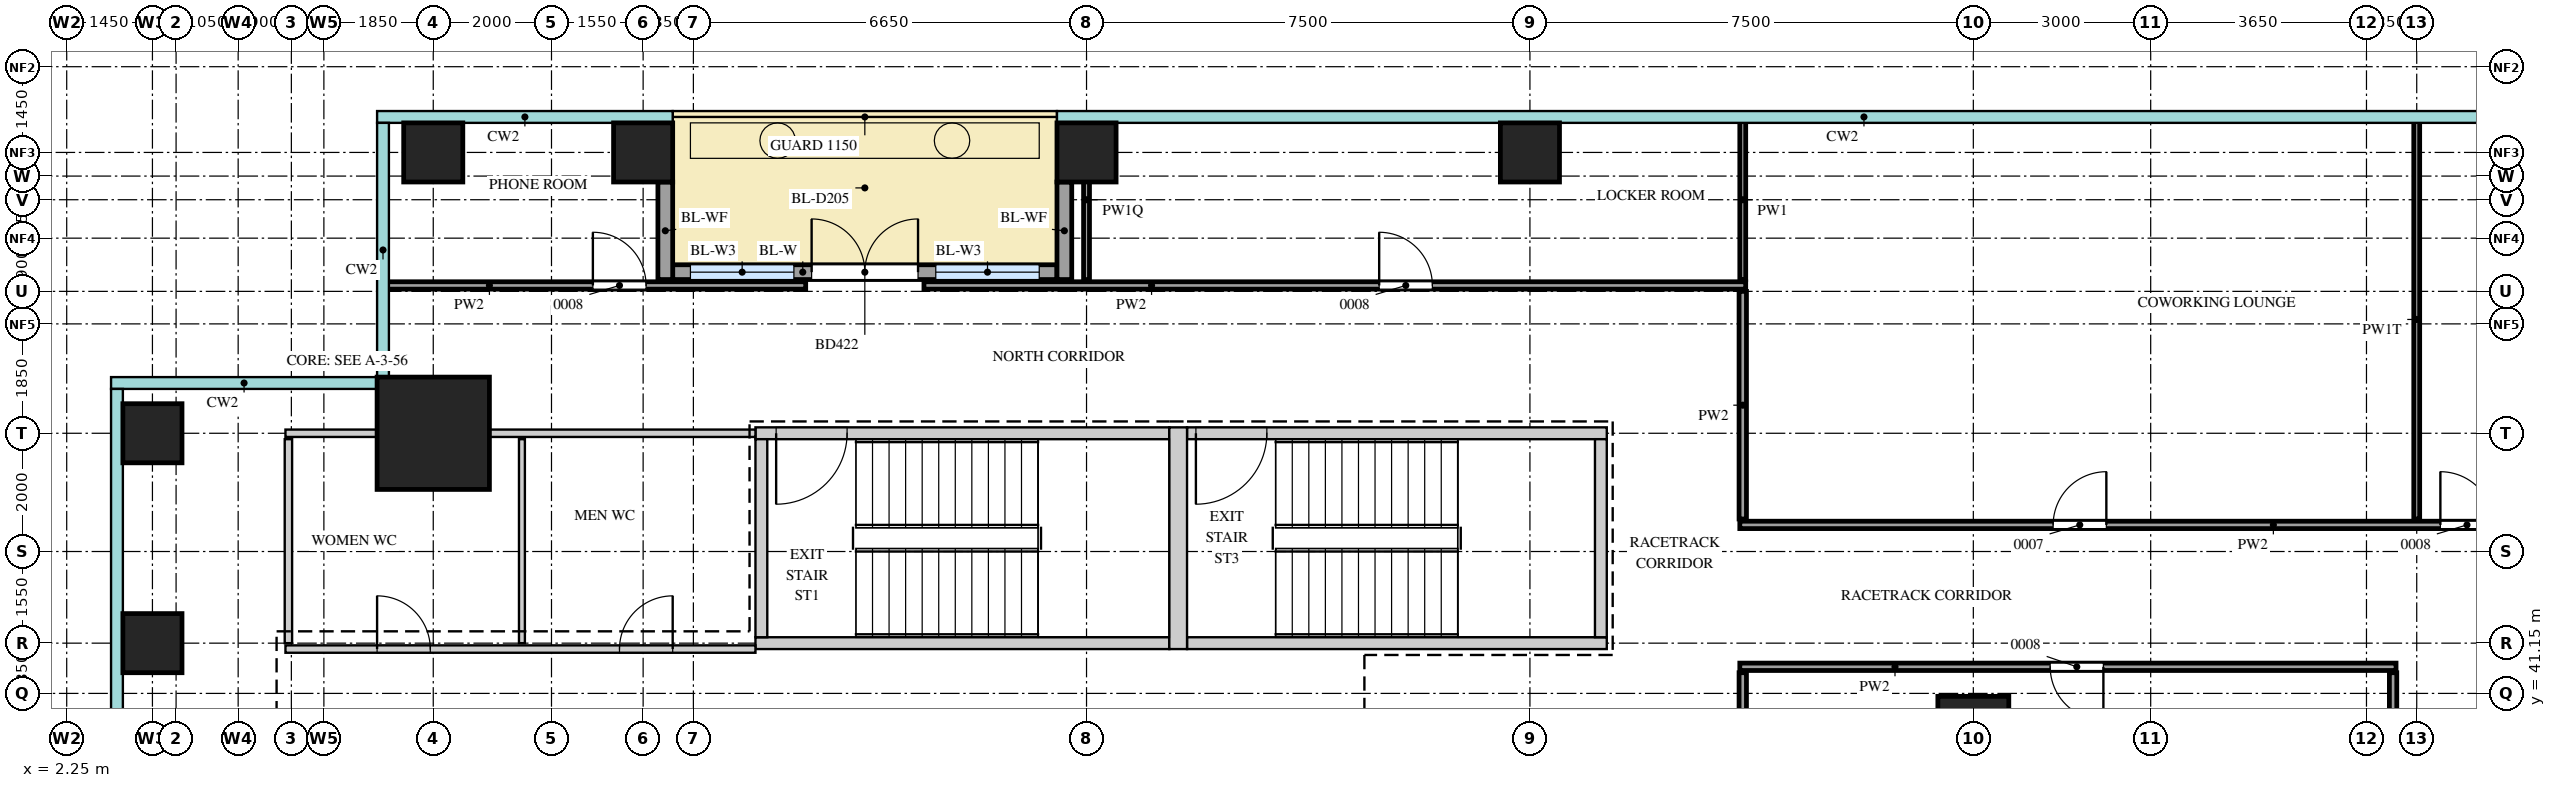
"""IFC4 building model, lengths in metres.
Left out: names, types, materials, properties, quantities, classifications, styles, units other than length and angle.
Written with IfcOpenShell. Run it as: python <this file> out.ifc"""

import sys

from ifc_helpers import new_model, si_unit, direction, frame, frame_2d, origin, origin_2d, place, context, subcontext, project, spatial, rectangle, extrude, source, transform, mapped, element, fill, save


model = new_model("IFC4")
c1 = context("Model", 3, precision=1e-05, world=origin(), true_north=direction((0.0, 1.0)))
c2 = subcontext(c1, "Body", "Model", "MODEL_VIEW")
j1 = project(units=[si_unit("LENGTHUNIT", "METRE"), si_unit("PLANEANGLEUNIT", "RADIAN")], contexts=[c1])
p1 = place(None, origin())
s1 = spatial("IfcSite", under=j1, at=p1, CompositionType="ELEMENT")
p2 = place(p1, origin())
s2 = spatial("IfcBuilding", under=s1, at=p2, CompositionType="ELEMENT")
p3 = place(p2, frame((0.0, 0.0, 192.7)))
s3 = spatial("IfcBuildingStorey", under=s2, at=p3, CompositionType="ELEMENT", Elevation=192.7)
m1 = source(origin(), c2, "Body", "SweptSolid", [
    extrude(rectangle(XDim=7.0, YDim=0.2, at=frame_2d((3.5, 0.0))), origin(), (0.0, 0.0, 1.0), 3.75),
])
p4 = place(p3, frame((13.9, 45.55, 0.0), z_axis=(0.0, 0.0, 1.0), x_axis=(1.0, 0.0, 0.0)))
e1 = element("IfcWall", 1, at=p4, inside=s3, PredefinedType="SHEAR", context=c2, shape_type="MappedRepresentation", body=[
    mapped(m1, transform((0.0, 0.0, 0.0))),
])
m2 = source(origin(), c2, "Body", "SweptSolid", [
    extrude(rectangle(XDim=1.2, YDim=2.1, at=frame_2d((0.6, 1.05))), frame((0.0, 0.11, 0.0), z_axis=(0.0, -1.0, 0.0), x_axis=(1.0, 0.0, 0.0)), (0.0, 0.0, 1.0), 0.22),
])
p5 = place(p4, frame((0.35, 0.0, 0.0)))
e2 = element("IfcOpeningElement", 2, at=p5, cuts=e1, PredefinedType="OPENING", context=c2, shape_type="MappedRepresentation", body=[
    mapped(m2, transform((0.0, 0.0, 0.0))),
])
p6 = place(p3, frame((13.9, 42.0, 0.0), z_axis=(0.0, 0.0, 1.0), x_axis=(1.0, 0.0, 0.0)))
e3 = element("IfcWall", 3, at=p6, inside=s3, PredefinedType="SHEAR", context=c2, shape_type="MappedRepresentation", body=[
    mapped(m1, transform((0.0, 0.0, 0.0))),
])
m3 = source(origin(), c2, "Body", "SweptSolid", [
    extrude(rectangle(XDim=7.1, YDim=0.2, at=frame_2d((3.55, 0.0))), origin(), (0.0, 0.0, 1.0), 3.75),
])
p7 = place(p3, frame((21.2, 45.55, 0.0), z_axis=(0.0, 0.0, 1.0), x_axis=(1.0, 0.0, 0.0)))
e4 = element("IfcWall", 4, at=p7, inside=s3, PredefinedType="SHEAR", context=c2, shape_type="MappedRepresentation", body=[
    mapped(m3, transform((0.0, 0.0, 0.0))),
])
p8 = place(p7, frame((0.15, 0.0, 0.0)))
e5 = element("IfcOpeningElement", 5, at=p8, cuts=e4, PredefinedType="OPENING", context=c2, shape_type="MappedRepresentation", body=[
    mapped(m2, transform((0.0, 0.0, 0.0))),
])
p9 = place(p3, frame((21.2, 42.0, 0.0), z_axis=(0.0, 0.0, 1.0), x_axis=(1.0, 0.0, 0.0)))
e6 = element("IfcWall", 6, at=p9, inside=s3, PredefinedType="SHEAR", context=c2, shape_type="MappedRepresentation", body=[
    mapped(m3, transform((0.0, 0.0, 0.0))),
])
m4 = source(origin(), c2, "Body", "SweptSolid", [
    extrude(rectangle(XDim=3.75, YDim=0.3, at=frame_2d((1.875, 0.0))), origin(), (0.0, 0.0, 1.0), 3.75),
])
p10 = place(p3, frame((21.05, 41.9, 0.0), z_axis=(0.0, 0.0, 1.0), x_axis=(0.0, 1.0, 0.0)))
e7 = element("IfcWall", 7, at=p10, inside=s3, PredefinedType="SHEAR", context=c2, shape_type="MappedRepresentation", body=[
    mapped(m4, transform((0.0, 0.0, 0.0))),
])
m5 = source(origin(), c2, "Body", "SweptSolid", [
    extrude(rectangle(XDim=3.35, YDim=0.2, at=frame_2d((1.675, 0.0))), origin(), (0.0, 0.0, 1.0), 3.75),
])
for number, where, z_axis, x_axis in (
    (8, (14.0, 42.1, 0.0), (0.0, 0.0, 1.0), (0.0, 1.0, 0.0)),
    (9, (28.2, 42.1, 0.0), (0.0, 0.0, 1.0), (0.0, 1.0, 0.0)),
):
    element("IfcWall", number, at=place(p3, frame(where, z_axis=z_axis, x_axis=x_axis)), inside=s3, PredefinedType="SHEAR", context=c2, shape_type="MappedRepresentation", body=[
        mapped(m5, transform((0.0, 0.0, 0.0))),
    ])
m6 = source(origin(), c2, "Body", "SweptSolid", [
    extrude(rectangle(XDim=1.9, YDim=1.9, at=origin_2d()), origin(), (0.0, 0.0, 1.0), 4.0),
])
p11 = place(p3, frame((8.45, 45.55, 0.0), z_axis=(0.0, 0.0, 1.0), x_axis=(1.0, 0.0, 0.0)))
e10 = element("IfcColumn", 10, at=p11, inside=s3, PredefinedType="COLUMN", context=c2, shape_type="MappedRepresentation", body=[
    mapped(m6, transform((0.0, 0.0, 0.0))),
])
m7 = source(origin(), c2, "Body", "SweptSolid", [
    extrude(rectangle(XDim=1.0, YDim=1.0, at=origin_2d()), origin(), (0.0, 0.0, 1.0), 3.75),
])
for number, where, z_axis, x_axis in (
    (11, (8.45, 50.3, 0.0), (0.0, 0.0, 1.0), (1.0, 0.0, 0.0)),
    (12, (12.0, 50.3, 0.0), (0.0, 0.0, 1.0), (1.0, 0.0, 0.0)),
    (13, (19.5, 50.3, 0.0), (0.0, 0.0, 1.0), (1.0, 0.0, 0.0)),
    (14, (27.0, 50.3, 0.0), (0.0, 0.0, 1.0), (1.0, 0.0, 0.0)),
    (15, (3.7, 42.0, 0.0), (0.0, 0.0, 1.0), (1.0, 0.0, 0.0)),
    (16, (3.7, 45.55, 0.0), (0.0, 0.0, 1.0), (1.0, 0.0, 0.0)),
):
    element("IfcColumn", number, at=place(p3, frame(where, z_axis=z_axis, x_axis=x_axis)), inside=s3, PredefinedType="COLUMN", context=c2, shape_type="MappedRepresentation", body=[
        mapped(m7, transform((0.0, 0.0, 0.0))),
    ])
m8 = source(origin(), c2, "Body", "SweptSolid", [
    extrude(rectangle(XDim=1.2, YDim=1.2, at=origin_2d()), origin(), (0.0, 0.0, 1.0), 3.75),
])
p12 = place(p3, frame((34.5, 40.5, 0.0), z_axis=(0.0, 0.0, 1.0), x_axis=(1.0, 0.0, 0.0)))
e17 = element("IfcColumn", 17, at=p12, inside=s3, PredefinedType="COLUMN", context=c2, shape_type="MappedRepresentation", body=[
    mapped(m8, transform((0.0, 0.0, 0.0))),
])
m9 = source(origin(), c2, "Body", "SweptSolid", [
    extrude(rectangle(XDim=6.5, YDim=0.25, at=frame_2d((3.25, 0.0))), origin(), (0.0, 0.0, 1.0), 3.75),
])
p13 = place(p3, frame((12.5, 48.275, 0.0), z_axis=(0.0, 0.0, 1.0), x_axis=(1.0, 0.0, 0.0)))
e18 = element("IfcWall", 18, at=p13, inside=s3, PredefinedType="SOLIDWALL", context=c2, shape_type="MappedRepresentation", body=[
    mapped(m9, transform((0.0, 0.0, 0.0))),
])
m10 = source(origin(), c2, "Body", "SweptSolid", [
    extrude(rectangle(XDim=1.75, YDim=2.4, at=frame_2d((0.875, 1.2))), frame((0.0, 0.135, 0.0), z_axis=(0.0, -1.0, 0.0), x_axis=(1.0, 0.0, 0.0)), (0.0, 0.0, 1.0), 0.27),
])
p14 = place(p13, frame((0.3, 0.0, 0.0)))
e19 = element("IfcOpeningElement", 19, at=p14, cuts=e18, PredefinedType="OPENING", context=c2, shape_type="MappedRepresentation", body=[
    mapped(m10, transform((0.0, 0.0, 0.0))),
])
p15 = place(p13, frame((4.45, 0.0, 0.0)))
e20 = element("IfcOpeningElement", 20, at=p15, cuts=e18, PredefinedType="OPENING", context=c2, shape_type="MappedRepresentation", body=[
    mapped(m10, transform((0.0, 0.0, 0.0))),
])
m11 = source(origin(), c2, "Body", "SweptSolid", [
    extrude(rectangle(XDim=1.8, YDim=2.4, at=frame_2d((0.9, 1.2))), frame((0.0, 0.135, 0.0), z_axis=(0.0, -1.0, 0.0), x_axis=(1.0, 0.0, 0.0)), (0.0, 0.0, 1.0), 0.27),
])
p16 = place(p13, frame((2.35, 0.0, 0.0)))
e21 = element("IfcOpeningElement", 21, at=p16, cuts=e18, PredefinedType="OPENING", context=c2, shape_type="MappedRepresentation", body=[
    mapped(m11, transform((0.0, 0.0, 0.0))),
])
m12 = source(origin(), c2, "Body", "SweptSolid", [
    extrude(rectangle(XDim=1.65, YDim=0.25, at=frame_2d((0.825, 0.0))), origin(), (0.0, 0.0, 1.0), 3.45),
])
for number, where, z_axis, x_axis in (
    (22, (12.375, 49.8, 0.0), (0.0, 0.0, 1.0), (0.0, -1.0, 0.0)),
    (23, (19.125, 49.8, 0.0), (0.0, 0.0, 1.0), (0.0, -1.0, 0.0)),
):
    element("IfcWall", number, at=place(p3, frame(where, z_axis=z_axis, x_axis=x_axis)), inside=s3, PredefinedType="SOLIDWALL", context=c2, shape_type="MappedRepresentation", body=[
        mapped(m12, transform((0.0, 0.0, 0.0))),
    ])
m13 = source(origin(), c2, "Body", "SweptSolid", [
    extrude(rectangle(XDim=29.0, YDim=0.125, at=frame_2d((14.5, 0.0))), origin(), (0.0, 0.0, 1.0), 3.8),
])
p17 = place(p3, frame((41.6, 12.5, 0.0), z_axis=(0.0, 0.0, 1.0), x_axis=(0.0, 1.0, 0.0)))
e24 = element("IfcWall", 24, at=p17, inside=s3, PredefinedType="PARTITIONING", context=c2, shape_type="MappedRepresentation", body=[
    mapped(m13, transform((0.0, 0.0, 0.0))),
])
m14 = source(origin(), c2, "Body", "SweptSolid", [
    extrude(rectangle(XDim=1.2, YDim=2.1, at=frame_2d((0.6, 1.05))), frame((0.0, 0.073, 0.0), z_axis=(0.0, -1.0, 0.0), x_axis=(1.0, 0.0, 0.0)), (0.0, 0.0, 1.0), 0.145),
])
p18 = place(p17, frame((18.4, 0.0, 0.0)))
e25 = element("IfcOpeningElement", 25, at=p18, cuts=e24, PredefinedType="OPENING", context=c2, shape_type="MappedRepresentation", body=[
    mapped(m14, transform((0.0, 0.0, 0.0))),
])
m15 = source(origin(), c2, "Body", "SweptSolid", [
    extrude(rectangle(XDim=5.4, YDim=0.125, at=frame_2d((2.7, 0.0))), origin(), (0.0, 0.0, 1.0), 3.8),
])
p19 = place(p3, frame((30.6, 36.1, 0.0), z_axis=(0.0, 0.0, 1.0), x_axis=(0.0, 1.0, 0.0)))
e26 = element("IfcWall", 26, at=p19, inside=s3, PredefinedType="PARTITIONING", context=c2, shape_type="MappedRepresentation", body=[
    mapped(m15, transform((0.0, 0.0, 0.0))),
])
m16 = source(origin(), c2, "Body", "SweptSolid", [
    extrude(rectangle(XDim=11.1, YDim=0.125, at=frame_2d((5.55, 0.0))), origin(), (0.0, 0.0, 1.0), 3.8),
])
p20 = place(p3, frame((30.55, 41.6, 0.0), z_axis=(0.0, 0.0, 1.0), x_axis=(1.0, 0.0, 0.0)))
e27 = element("IfcWall", 27, at=p20, inside=s3, PredefinedType="PARTITIONING", context=c2, shape_type="MappedRepresentation", body=[
    mapped(m16, transform((0.0, 0.0, 0.0))),
])
m17 = source(origin(), c2, "Body", "SweptSolid", [
    extrude(rectangle(XDim=0.9, YDim=2.1, at=frame_2d((0.45, 1.05))), frame((0.0, 0.073, 0.0), z_axis=(0.0, -1.0, 0.0), x_axis=(1.0, 0.0, 0.0)), (0.0, 0.0, 1.0), 0.145),
])
p21 = place(p20, frame((5.25, 0.0, 0.0)))
e28 = element("IfcOpeningElement", 28, at=p21, cuts=e27, PredefinedType="OPENING", context=c2, shape_type="MappedRepresentation", body=[
    mapped(m17, transform((0.0, 0.0, 0.0))),
])
m18 = source(origin(), c2, "Body", "SweptSolid", [
    extrude(rectangle(XDim=7.95, YDim=0.125, at=frame_2d((3.975, 0.0))), origin(), (0.0, 0.0, 1.0), 3.8),
])
p22 = place(p3, frame((5.95, 41.9, 0.0), z_axis=(0.0, 0.0, 1.0), x_axis=(1.0, 0.0, 0.0)))
e29 = element("IfcWall", 29, at=p22, inside=s3, PredefinedType="PARTITIONING", context=c2, shape_type="MappedRepresentation", body=[
    mapped(m18, transform((0.0, 0.0, 0.0))),
])
p23 = place(p22, frame((1.55, 0.0, 0.0)))
e30 = element("IfcOpeningElement", 30, at=p23, cuts=e29, PredefinedType="OPENING", context=c2, shape_type="MappedRepresentation", body=[
    mapped(m17, transform((0.0, 0.0, 0.0))),
])
p24 = place(p22, frame((5.65, 0.0, 0.0)))
e31 = element("IfcOpeningElement", 31, at=p24, cuts=e29, PredefinedType="OPENING", context=c2, shape_type="MappedRepresentation", body=[
    mapped(m17, transform((0.0, 0.0, 0.0))),
])
m19 = source(origin(), c2, "Body", "SweptSolid", [
    extrude(rectangle(XDim=3.45, YDim=0.125, at=frame_2d((1.725, 0.0))), origin(), (0.0, 0.0, 1.0), 3.8),
])
p25 = place(p3, frame((6.0, 42.0, 0.0), z_axis=(0.0, 0.0, 1.0), x_axis=(0.0, 1.0, 0.0)))
e32 = element("IfcWall", 32, at=p25, inside=s3, PredefinedType="PARTITIONING", context=c2, shape_type="MappedRepresentation", body=[
    mapped(m19, transform((0.0, 0.0, 0.0))),
])
m20 = source(origin(), c2, "Body", "SweptSolid", [
    extrude(rectangle(XDim=3.45, YDim=0.1, at=frame_2d((1.725, 0.0))), origin(), (0.0, 0.0, 1.0), 3.8),
])
p26 = place(p3, frame((9.95, 42.0, 0.0), z_axis=(0.0, 0.0, 1.0), x_axis=(0.0, 1.0, 0.0)))
e33 = element("IfcWall", 33, at=p26, inside=s3, PredefinedType="PARTITIONING", context=c2, shape_type="MappedRepresentation", body=[
    mapped(m20, transform((0.0, 0.0, 0.0))),
])
m21 = source(origin(), c2, "Body", "SweptSolid", [
    extrude(rectangle(XDim=13.4, YDim=0.125, at=frame_2d((6.7, 0.0))), origin(), (0.0, 0.0, 1.0), 3.8),
])
p27 = place(p3, frame((30.55, 44.0, 0.0), z_axis=(0.0, 0.0, 1.0), x_axis=(1.0, 0.0, 0.0)))
e34 = element("IfcWall", 34, at=p27, inside=s3, PredefinedType="PARTITIONING", context=c2, shape_type="MappedRepresentation", body=[
    mapped(m21, transform((0.0, 0.0, 0.0))),
])
p28 = place(p27, frame((5.3, 0.0, 0.0)))
e35 = element("IfcOpeningElement", 35, at=p28, cuts=e34, PredefinedType="OPENING", context=c2, shape_type="MappedRepresentation", body=[
    mapped(m17, transform((0.0, 0.0, 0.0))),
])
p29 = place(p27, frame((11.85, 0.0, 0.0)))
e36 = element("IfcOpeningElement", 36, at=p29, cuts=e34, PredefinedType="OPENING", context=c2, shape_type="MappedRepresentation", body=[
    mapped(m17, transform((0.0, 0.0, 0.0))),
])
m22 = source(origin(), c2, "Body", "SweptSolid", [
    extrude(rectangle(XDim=3.85, YDim=0.125, at=frame_2d((1.925, 0.0))), origin(), (0.0, 0.0, 1.0), 3.8),
])
p30 = place(p3, frame((30.6, 44.1, 0.0), z_axis=(0.0, 0.0, 1.0), x_axis=(0.0, 1.0, 0.0)))
e37 = element("IfcWall", 37, at=p30, inside=s3, PredefinedType="PARTITIONING", context=c2, shape_type="MappedRepresentation", body=[
    mapped(m22, transform((0.0, 0.0, 0.0))),
])
m23 = source(origin(), c2, "Body", "SweptSolid", [
    extrude(rectangle(XDim=6.75, YDim=0.1, at=frame_2d((3.375, 0.0))), origin(), (0.0, 0.0, 1.0), 3.3),
])
p31 = place(p3, frame((42.0, 44.1, 0.0), z_axis=(0.0, 0.0, 1.0), x_axis=(0.0, 1.0, 0.0)))
e38 = element("IfcWall", 38, at=p31, inside=s3, PredefinedType="PARTITIONING", context=c2, shape_type="MappedRepresentation", body=[
    mapped(m23, transform((0.0, 0.0, 0.0))),
])
m24 = source(origin(), c2, "Body", "SweptSolid", [
    extrude(rectangle(XDim=7.95, YDim=0.125, at=frame_2d((3.975, 0.0))), origin(), (0.0, 0.0, 1.0), 3.25),
])
p32 = place(p3, frame((5.95, 45.55, 0.0), z_axis=(0.0, 0.0, 1.0), x_axis=(1.0, 0.0, 0.0)))
e39 = element("IfcWall", 39, at=p32, inside=s3, PredefinedType="PARTITIONING", context=c2, shape_type="MappedRepresentation", body=[
    mapped(m24, transform((0.0, 0.0, 0.0))),
])
m25 = source(origin(), c2, "Body", "SweptSolid", [
    extrude(rectangle(XDim=2.7, YDim=0.1, at=frame_2d((1.35, 0.0))), origin(), (0.0, 0.0, 1.0), 3.42),
])
p33 = place(p3, frame((19.5, 48.15, 0.0), z_axis=(0.0, 0.0, 1.0), x_axis=(0.0, 1.0, 0.0)))
e40 = element("IfcWall", 40, at=p33, inside=s3, PredefinedType="PARTITIONING", context=c2, shape_type="MappedRepresentation", body=[
    mapped(m25, transform((0.0, 0.0, 0.0))),
])
m26 = source(origin(), c2, "Body", "SweptSolid", [
    extrude(rectangle(XDim=2.7, YDim=0.1, at=frame_2d((1.35, 0.0))), origin(), (0.0, 0.0, 1.0), 3.8),
])
p34 = place(p3, frame((30.6, 48.15, 0.0), z_axis=(0.0, 0.0, 1.0), x_axis=(0.0, 1.0, 0.0)))
e41 = element("IfcWall", 41, at=p34, inside=s3, PredefinedType="PARTITIONING", context=c2, shape_type="MappedRepresentation", body=[
    mapped(m26, transform((0.0, 0.0, 0.0))),
])
m27 = source(origin(), c2, "Body", "SweptSolid", [
    extrude(rectangle(XDim=7.1, YDim=0.125, at=frame_2d((3.55, 0.0))), origin(), (0.0, 0.0, 1.0), 3.8),
])
p35 = place(p3, frame((7.65, 48.05, 0.0), z_axis=(0.0, 0.0, 1.0), x_axis=(1.0, 0.0, 0.0)))
e42 = element("IfcWall", 42, at=p35, inside=s3, PredefinedType="PARTITIONING", context=c2, shape_type="MappedRepresentation", body=[
    mapped(m27, transform((0.0, 0.0, 0.0))),
])
p36 = place(p35, frame((3.5, 0.0, 0.0)))
e43 = element("IfcOpeningElement", 43, at=p36, cuts=e42, PredefinedType="OPENING", context=c2, shape_type="MappedRepresentation", body=[
    mapped(m17, transform((0.0, 0.0, 0.0))),
])
m28 = source(origin(), c2, "Body", "SweptSolid", [
    extrude(rectangle(XDim=13.9, YDim=0.125, at=frame_2d((6.95, 0.0))), origin(), (0.0, 0.0, 1.0), 3.8),
])
p37 = place(p3, frame((16.75, 48.05, 0.0), z_axis=(0.0, 0.0, 1.0), x_axis=(1.0, 0.0, 0.0)))
e44 = element("IfcWall", 44, at=p37, inside=s3, PredefinedType="PARTITIONING", context=c2, shape_type="MappedRepresentation", body=[
    mapped(m28, transform((0.0, 0.0, 0.0))),
])
p38 = place(p37, frame((7.7, 0.0, 0.0)))
e45 = element("IfcOpeningElement", 45, at=p38, cuts=e44, PredefinedType="OPENING", context=c2, shape_type="MappedRepresentation", body=[
    mapped(m17, transform((0.0, 0.0, 0.0))),
])
m29 = source(origin(), c2, "Body", "SweptSolid", [
    extrude(rectangle(XDim=1.75, YDim=2.4, at=frame_2d((0.875, 1.2))), frame((0.0, 0.03, 0.0), z_axis=(0.0, -1.0, 0.0), x_axis=(1.0, 0.0, 0.0)), (0.0, 0.0, 1.0), 0.06),
])
p39 = place(p14, origin())
e46 = element("IfcWindow", 46, at=p39, inside=s3, PartitioningType="SINGLE_PANEL", PredefinedType="WINDOW", context=c2, shape_type="MappedRepresentation", body=[
    mapped(m29, transform((0.0, 0.0, 0.0))),
])
fill(e19, e46)
p40 = place(p15, origin())
e47 = element("IfcWindow", 47, at=p40, inside=s3, PartitioningType="SINGLE_PANEL", PredefinedType="WINDOW", context=c2, shape_type="MappedRepresentation", body=[
    mapped(m29, transform((0.0, 0.0, 0.0))),
])
fill(e20, e47)
m30 = source(origin(), c2, "Body", "SweptSolid", [
    extrude(rectangle(XDim=1.8, YDim=2.4, at=frame_2d((0.9, 1.2))), frame((0.0, 0.025, 0.0), z_axis=(0.0, -1.0, 0.0), x_axis=(1.0, 0.0, 0.0)), (0.0, 0.0, 1.0), 0.05),
])
p41 = place(p16, origin())
e48 = element("IfcDoor", 48, at=p41, inside=s3, OperationType="DOUBLE_DOOR_DOUBLE_SWING", PredefinedType="DOOR", context=c2, shape_type="MappedRepresentation", body=[
    mapped(m30, transform((0.0, 0.0, 0.0))),
])
fill(e21, e48)
m31 = source(origin(), c2, "Body", "SweptSolid", [
    extrude(rectangle(XDim=0.9, YDim=2.1, at=frame_2d((0.45, 1.05))), frame((0.0, 0.025, 0.0), z_axis=(0.0, -1.0, 0.0), x_axis=(1.0, 0.0, 0.0)), (0.0, 0.0, 1.0), 0.05),
])
p42 = place(p28, origin())
e49 = element("IfcDoor", 49, at=p42, inside=s3, OperationType="SINGLE_SWING_LEFT", PredefinedType="DOOR", context=c2, shape_type="MappedRepresentation", body=[
    mapped(m31, transform((0.0, 0.0, 0.0))),
])
fill(e35, e49)
p43 = place(p29, origin())
e50 = element("IfcDoor", 50, at=p43, inside=s3, OperationType="SINGLE_SWING_RIGHT", PredefinedType="DOOR", context=c2, shape_type="MappedRepresentation", body=[
    mapped(m31, transform((0.0, 0.0, 0.0))),
])
fill(e36, e50)
p44 = place(p21, origin())
e51 = element("IfcDoor", 51, at=p44, inside=s3, OperationType="SINGLE_SWING_RIGHT", PredefinedType="DOOR", context=c2, shape_type="MappedRepresentation", body=[
    mapped(m31, transform((0.0, 0.0, 0.0))),
])
fill(e28, e51)
p45 = place(p23, origin())
e52 = element("IfcDoor", 52, at=p45, inside=s3, OperationType="SINGLE_SWING_RIGHT", PredefinedType="DOOR", context=c2, shape_type="MappedRepresentation", body=[
    mapped(m31, transform((0.0, 0.0, 0.0))),
])
fill(e30, e52)
p46 = place(p24, origin())
e53 = element("IfcDoor", 53, at=p46, inside=s3, OperationType="SINGLE_SWING_LEFT", PredefinedType="DOOR", context=c2, shape_type="MappedRepresentation", body=[
    mapped(m31, transform((0.0, 0.0, 0.0))),
])
fill(e31, e53)
p47 = place(p36, origin())
e54 = element("IfcDoor", 54, at=p47, inside=s3, OperationType="SINGLE_SWING_RIGHT", PredefinedType="DOOR", context=c2, shape_type="MappedRepresentation", body=[
    mapped(m31, transform((0.0, 0.0, 0.0))),
])
fill(e43, e54)
p48 = place(p38, origin())
e55 = element("IfcDoor", 55, at=p48, inside=s3, OperationType="SINGLE_SWING_RIGHT", PredefinedType="DOOR", context=c2, shape_type="MappedRepresentation", body=[
    mapped(m31, transform((0.0, 0.0, 0.0))),
])
fill(e45, e55)
m32 = source(origin(), c2, "Body", "SweptSolid", [
    extrude(rectangle(XDim=1.2, YDim=2.1, at=frame_2d((0.6, 1.05))), frame((0.0, 0.025, 0.0), z_axis=(0.0, -1.0, 0.0), x_axis=(1.0, 0.0, 0.0)), (0.0, 0.0, 1.0), 0.05),
])
p49 = place(p5, origin())
e56 = element("IfcDoor", 56, at=p49, inside=s3, OperationType="SINGLE_SWING_LEFT", PredefinedType="DOOR", context=c2, shape_type="MappedRepresentation", body=[
    mapped(m32, transform((0.0, 0.0, 0.0))),
])
fill(e2, e56)
p50 = place(p8, origin())
e57 = element("IfcDoor", 57, at=p50, inside=s3, OperationType="SINGLE_SWING_LEFT", PredefinedType="DOOR", context=c2, shape_type="MappedRepresentation", body=[
    mapped(m32, transform((0.0, 0.0, 0.0))),
])
fill(e5, e57)
save(model, sys.argv[1])
